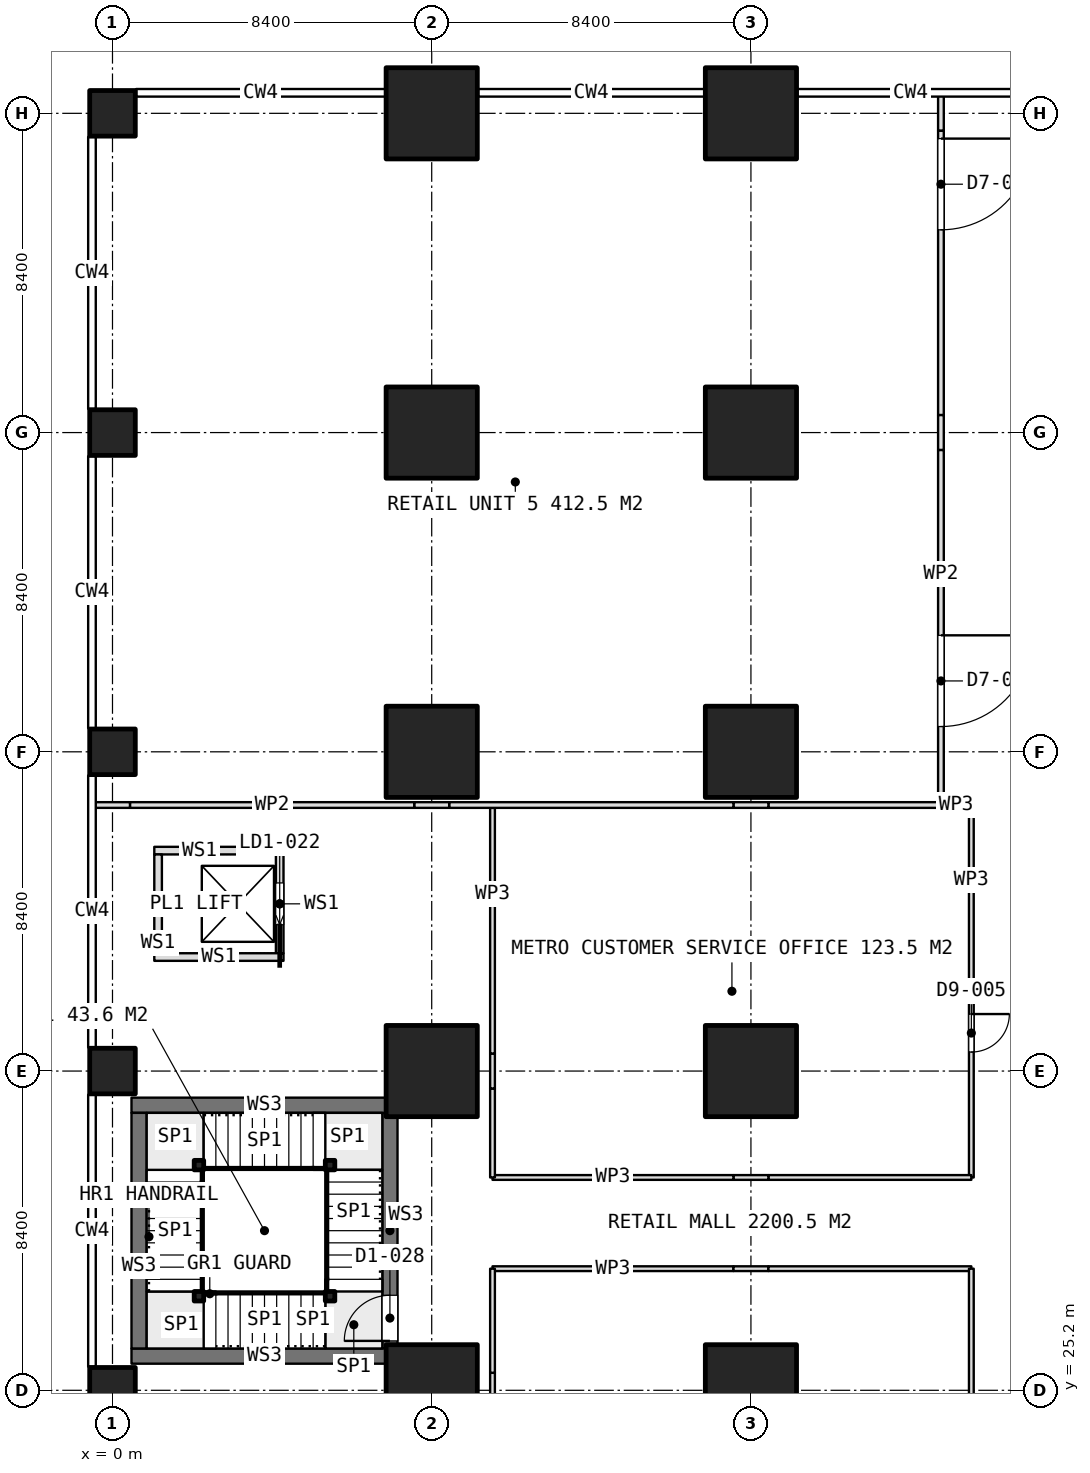
"""IFC4 building model, lengths in metres.
Left out: names, types, materials, properties, quantities, classifications, styles, units other than length and angle.
Written with IfcOpenShell. Run it as: python <this file> out.ifc"""

import sys

from ifc_helpers import new_model, si_unit, direction, frame, frame_2d, origin, origin_2d, place, context, subcontext, project, spatial, rectangle, extrude, element, fill, save


model = new_model("IFC4")
c1 = context("Model", 3, precision=1e-05, world=origin(), true_north=direction((0.0, 1.0)))
c2 = subcontext(c1, "Body", "Model", "MODEL_VIEW")
j1 = project(units=[si_unit("LENGTHUNIT", "METRE"), si_unit("PLANEANGLEUNIT", "RADIAN")], contexts=[c1])
p1 = place(None, origin())
s1 = spatial("IfcSite", under=j1, at=p1, CompositionType="ELEMENT")
p2 = place(p1, origin())
s2 = spatial("IfcBuilding", under=s1, at=p2, CompositionType="ELEMENT")
p3 = place(p2, frame((0.0, 0.0, 5.4)))
s3 = spatial("IfcBuildingStorey", under=s2, at=p3, CompositionType="ELEMENT", Elevation=5.4)
for number, where, z_axis, x_axis in (
    (1, (0.0, 25.2, 0.0), (0.0, 0.0, 1.0), (1.0, 0.0, 0.0)),
    (2, (0.0, 33.6, 0.0), (0.0, 0.0, 1.0), (1.0, 0.0, 0.0)),
    (3, (0.0, 42.0, 0.0), (0.0, 0.0, 1.0), (1.0, 0.0, 0.0)),
    (4, (0.0, 50.4, 0.0), (0.0, 0.0, 1.0), (1.0, 0.0, 0.0)),
    (5, (0.0, 58.8, 0.0), (0.0, 0.0, 1.0), (1.0, 0.0, 0.0)),
):
    element("IfcColumn", number, at=place(p3, frame(where, z_axis=z_axis, x_axis=x_axis)), inside=s3, PredefinedType="COLUMN", context=c2, shape_type="SweptSolid", body=[
        extrude(rectangle(XDim=1.2, YDim=1.2, at=origin_2d()), origin(), (0.0, 0.0, 1.0), 5.0),
    ])
for number, where, z_axis, x_axis in (
    (6, (8.4, 25.2, 0.0), (0.0, 0.0, 1.0), (1.0, 0.0, 0.0)),
    (7, (8.4, 33.6, 0.0), (0.0, 0.0, 1.0), (1.0, 0.0, 0.0)),
    (8, (8.4, 42.0, 0.0), (0.0, 0.0, 1.0), (1.0, 0.0, 0.0)),
    (9, (8.4, 50.4, 0.0), (0.0, 0.0, 1.0), (1.0, 0.0, 0.0)),
    (10, (8.4, 58.8, 0.0), (0.0, 0.0, 1.0), (1.0, 0.0, 0.0)),
    (11, (16.8, 25.2, 0.0), (0.0, 0.0, 1.0), (1.0, 0.0, 0.0)),
    (12, (16.8, 33.6, 0.0), (0.0, 0.0, 1.0), (1.0, 0.0, 0.0)),
    (13, (16.8, 42.0, 0.0), (0.0, 0.0, 1.0), (1.0, 0.0, 0.0)),
    (14, (16.8, 50.4, 0.0), (0.0, 0.0, 1.0), (1.0, 0.0, 0.0)),
    (15, (16.8, 58.8, 0.0), (0.0, 0.0, 1.0), (1.0, 0.0, 0.0)),
):
    element("IfcColumn", number, at=place(p3, frame(where, z_axis=z_axis, x_axis=x_axis)), inside=s3, PredefinedType="COLUMN", context=c2, shape_type="SweptSolid", body=[
        extrude(rectangle(XDim=2.4, YDim=2.4, at=origin_2d()), origin(), (0.0, 0.0, 1.0), 5.0),
    ])
for number, where, z_axis, x_axis in (
    (16, (0.5, 26.1, 0.0), (0.0, 0.0, 1.0), (1.0, 0.0, 0.0)),
    (17, (0.5, 32.7, 0.0), (0.0, 0.0, 1.0), (1.0, 0.0, 0.0)),
):
    element("IfcWall", number, at=place(p3, frame(where, z_axis=z_axis, x_axis=x_axis)), inside=s3, PredefinedType="SOLIDWALL", context=c2, shape_type="SweptSolid", body=[
        extrude(rectangle(XDim=7.0, YDim=0.4, at=frame_2d((3.5, 0.0))), origin(), (0.0, 0.0, 1.0), 4.7),
    ])
p4 = place(p3, frame((0.7, 26.3, 0.0), z_axis=(0.0, 0.0, 1.0), x_axis=(0.0, 1.0, 0.0)))
e18 = element("IfcWall", 18, at=p4, inside=s3, PredefinedType="SOLIDWALL", context=c2, shape_type="SweptSolid", body=[
    extrude(rectangle(XDim=6.2, YDim=0.4, at=frame_2d((3.1, 0.0))), origin(), (0.0, 0.0, 1.0), 4.7),
])
p5 = place(p3, frame((7.3, 26.3, 0.0), z_axis=(0.0, 0.0, 1.0), x_axis=(0.0, 1.0, 0.0)))
e19 = element("IfcWall", 19, at=p5, inside=s3, PredefinedType="SOLIDWALL", context=c2, shape_type="SweptSolid", body=[
    extrude(rectangle(XDim=6.2, YDim=0.4, at=frame_2d((3.1, 0.0))), origin(), (0.0, 0.0, 1.0), 4.7),
])
p6 = place(p5, frame((0.2, 0.0, 0.0)))
e20 = element("IfcOpeningElement", 20, at=p6, cuts=e19, PredefinedType="OPENING", context=c2, shape_type="SweptSolid", body=[
    extrude(rectangle(XDim=1.2, YDim=2.1, at=frame_2d((0.6, 1.05))), frame((0.0, 0.21, 0.0), z_axis=(0.0, -1.0, 0.0), x_axis=(1.0, 0.0, 0.0)), (0.0, 0.0, 1.0), 0.42),
])
for number, where, z_axis, x_axis in (
    (21, (1.1, 36.6, 0.0), (0.0, 0.0, 1.0), (1.0, 0.0, 0.0)),
    (22, (1.1, 39.4, 0.0), (0.0, 0.0, 1.0), (1.0, 0.0, 0.0)),
):
    element("IfcWall", number, at=place(p3, frame(where, z_axis=z_axis, x_axis=x_axis)), inside=s3, PredefinedType="PARTITIONING", context=c2, shape_type="SweptSolid", body=[
        extrude(rectangle(XDim=3.4, YDim=0.2, at=frame_2d((1.7, 0.0))), origin(), (0.0, 0.0, 1.0), 2.9),
    ])
p7 = place(p3, frame((1.2, 36.7, 0.0), z_axis=(0.0, 0.0, 1.0), x_axis=(0.0, 1.0, 0.0)))
e23 = element("IfcWall", 23, at=p7, inside=s3, PredefinedType="PARTITIONING", context=c2, shape_type="SweptSolid", body=[
    extrude(rectangle(XDim=2.6, YDim=0.2, at=frame_2d((1.3, 0.0))), origin(), (0.0, 0.0, 1.0), 2.9),
])
p8 = place(p3, frame((4.4, 36.7, 0.0), z_axis=(0.0, 0.0, 1.0), x_axis=(0.0, 1.0, 0.0)))
e24 = element("IfcWall", 24, at=p8, inside=s3, PredefinedType="PARTITIONING", context=c2, shape_type="SweptSolid", body=[
    extrude(rectangle(XDim=2.6, YDim=0.2, at=frame_2d((1.3, 0.0))), origin(), (0.0, 0.0, 1.0), 2.9),
])
p9 = place(p8, frame((0.75, 0.0, 0.0)))
e25 = element("IfcOpeningElement", 25, at=p9, cuts=e24, PredefinedType="OPENING", context=c2, shape_type="SweptSolid", body=[
    extrude(rectangle(XDim=1.1, YDim=2.1, at=frame_2d((0.55, 1.05))), frame((0.0, 0.11, 0.0), z_axis=(0.0, -1.0, 0.0), x_axis=(1.0, 0.0, 0.0)), (0.0, 0.0, 1.0), 0.22),
])
p10 = place(p3, frame((21.8, 59.29, 0.0), z_axis=(0.0, 0.0, 1.0), x_axis=(0.0, -1.0, 0.0)))
e26 = element("IfcWall", 26, at=p10, inside=s3, PredefinedType="PARTITIONING", context=c2, shape_type="SweptSolid", body=[
    extrude(rectangle(XDim=0.95, YDim=0.15, at=frame_2d((0.475, 0.0))), origin(), (0.0, 0.0, 1.0), 2.9),
])
p11 = place(p3, frame((21.8, 58.34, 0.0), z_axis=(0.0, 0.0, 1.0), x_axis=(0.0, -1.0, 0.0)))
e27 = element("IfcWall", 27, at=p11, inside=s3, PredefinedType="PARTITIONING", context=c2, shape_type="SweptSolid", body=[
    extrude(rectangle(XDim=7.48, YDim=0.15, at=frame_2d((3.74, 0.0))), origin(), (0.0, 0.0, 1.0), 4.7),
])
p12 = place(p11, frame((0.205, 0.0, 0.0)))
e28 = element("IfcOpeningElement", 28, at=p12, cuts=e27, PredefinedType="OPENING", context=c2, shape_type="SweptSolid", body=[
    extrude(rectangle(XDim=2.4, YDim=2.4, at=frame_2d((1.2, 1.2))), frame((0.0, 0.085, 0.0), z_axis=(0.0, -1.0, 0.0), x_axis=(1.0, 0.0, 0.0)), (0.0, 0.0, 1.0), 0.17),
])
p13 = place(p3, frame((21.8, 50.86, 0.0), z_axis=(0.0, 0.0, 1.0), x_axis=(0.0, -1.0, 0.0)))
e29 = element("IfcWall", 29, at=p13, inside=s3, PredefinedType="PARTITIONING", context=c2, shape_type="SweptSolid", body=[
    extrude(rectangle(XDim=0.92, YDim=0.15, at=frame_2d((0.46, 0.0))), origin(), (0.0, 0.0, 1.0), 2.9),
])
p14 = place(p3, frame((21.8, 49.94, 0.0), z_axis=(0.0, 0.0, 1.0), x_axis=(0.0, -1.0, 0.0)))
e30 = element("IfcWall", 30, at=p14, inside=s3, PredefinedType="PARTITIONING", context=c2, shape_type="SweptSolid", body=[
    extrude(rectangle(XDim=9.34, YDim=0.15, at=frame_2d((4.67, 0.0))), origin(), (0.0, 0.0, 1.0), 4.7),
])
p15 = place(p14, frame((4.875, 0.0, 0.0)))
e31 = element("IfcOpeningElement", 31, at=p15, cuts=e30, PredefinedType="OPENING", context=c2, shape_type="SweptSolid", body=[
    extrude(rectangle(XDim=2.4, YDim=2.4, at=frame_2d((1.2, 1.2))), frame((0.0, 0.085, 0.0), z_axis=(0.0, -1.0, 0.0), x_axis=(1.0, 0.0, 0.0)), (0.0, 0.0, 1.0), 0.17),
])
p16 = place(p3, frame((21.8, 40.6, 0.0), z_axis=(0.0, 0.0, 1.0), x_axis=(-1.0, 0.0, 0.0)))
e32 = element("IfcWall", 32, at=p16, inside=s3, PredefinedType="PARTITIONING", context=c2, shape_type="SweptSolid", body=[
    extrude(rectangle(XDim=4.54, YDim=0.15, at=frame_2d((2.27, 0.0))), origin(), (0.0, 0.0, 1.0), 4.7),
])
p17 = place(p3, frame((17.26, 40.6, 0.0), z_axis=(0.0, 0.0, 1.0), x_axis=(-1.0, 0.0, 0.0)))
e33 = element("IfcWall", 33, at=p17, inside=s3, PredefinedType="PARTITIONING", context=c2, shape_type="SweptSolid", body=[
    extrude(rectangle(XDim=0.92, YDim=0.15, at=frame_2d((0.46, 0.0))), origin(), (0.0, 0.0, 1.0), 2.9),
])
p18 = place(p3, frame((16.34, 40.6, 0.0), z_axis=(0.0, 0.0, 1.0), x_axis=(-1.0, 0.0, 0.0)))
e34 = element("IfcWall", 34, at=p18, inside=s3, PredefinedType="PARTITIONING", context=c2, shape_type="SweptSolid", body=[
    extrude(rectangle(XDim=7.48, YDim=0.15, at=frame_2d((3.74, 0.0))), origin(), (0.0, 0.0, 1.0), 4.7),
])
p19 = place(p3, frame((8.86, 40.6, 0.0), z_axis=(0.0, 0.0, 1.0), x_axis=(-1.0, 0.0, 0.0)))
e35 = element("IfcWall", 35, at=p19, inside=s3, PredefinedType="PARTITIONING", context=c2, shape_type="SweptSolid", body=[
    extrude(rectangle(XDim=0.92, YDim=0.15, at=frame_2d((0.46, 0.0))), origin(), (0.0, 0.0, 1.0), 2.9),
])
p20 = place(p3, frame((7.94, 40.6, 0.0), z_axis=(0.0, 0.0, 1.0), x_axis=(-1.0, 0.0, 0.0)))
e36 = element("IfcWall", 36, at=p20, inside=s3, PredefinedType="PARTITIONING", context=c2, shape_type="SweptSolid", body=[
    extrude(rectangle(XDim=7.48, YDim=0.15, at=frame_2d((3.74, 0.0))), origin(), (0.0, 0.0, 1.0), 4.7),
])
p21 = place(p3, frame((0.46, 40.6, 0.0), z_axis=(0.0, 0.0, 1.0), x_axis=(-1.0, 0.0, 0.0)))
e37 = element("IfcWall", 37, at=p21, inside=s3, PredefinedType="PARTITIONING", context=c2, shape_type="SweptSolid", body=[
    extrude(rectangle(XDim=0.95, YDim=0.15, at=frame_2d((0.475, 0.0))), origin(), (0.0, 0.0, 1.0), 2.9),
])
p22 = place(p3, frame((10.0, 28.4, 0.0), z_axis=(0.0, 0.0, 1.0), x_axis=(1.0, 0.0, 0.0)))
e38 = element("IfcWall", 38, at=p22, inside=s3, PredefinedType="PARTITIONING", context=c2, shape_type="SweptSolid", body=[
    extrude(rectangle(XDim=6.34, YDim=0.125, at=frame_2d((3.17, 0.0))), origin(), (0.0, 0.0, 1.0), 4.7),
])
p23 = place(p3, frame((16.34, 28.4, 0.0), z_axis=(0.0, 0.0, 1.0), x_axis=(1.0, 0.0, 0.0)))
e39 = element("IfcWall", 39, at=p23, inside=s3, PredefinedType="PARTITIONING", context=c2, shape_type="SweptSolid", body=[
    extrude(rectangle(XDim=0.92, YDim=0.125, at=frame_2d((0.46, 0.0))), origin(), (0.0, 0.0, 1.0), 2.9),
])
p24 = place(p3, frame((17.26, 28.4, 0.0), z_axis=(0.0, 0.0, 1.0), x_axis=(1.0, 0.0, 0.0)))
e40 = element("IfcWall", 40, at=p24, inside=s3, PredefinedType="PARTITIONING", context=c2, shape_type="SweptSolid", body=[
    extrude(rectangle(XDim=5.34, YDim=0.125, at=frame_2d((2.67, 0.0))), origin(), (0.0, 0.0, 1.0), 4.7),
])
p25 = place(p3, frame((22.6, 28.4, 0.0), z_axis=(0.0, 0.0, 1.0), x_axis=(0.0, -1.0, 0.0)))
e41 = element("IfcWall", 41, at=p25, inside=s3, PredefinedType="PARTITIONING", context=c2, shape_type="SweptSolid", body=[
    extrude(rectangle(XDim=9.8, YDim=0.125, at=frame_2d((4.9, 0.0))), origin(), (0.0, 0.0, 1.0), 4.7),
])
p26 = place(p25, frame((4.4, 0.0, 0.0)))
e42 = element("IfcOpeningElement", 42, at=p26, cuts=e41, PredefinedType="OPENING", context=c2, shape_type="SweptSolid", body=[
    extrude(rectangle(XDim=1.0, YDim=2.1, at=frame_2d((0.5, 1.05))), frame((0.0, 0.073, 0.0), z_axis=(0.0, -1.0, 0.0), x_axis=(1.0, 0.0, 0.0)), (0.0, 0.0, 1.0), 0.145),
])
p27 = place(p3, frame((10.0, 24.74, 0.0), z_axis=(0.0, 0.0, 1.0), x_axis=(0.0, 1.0, 0.0)))
e43 = element("IfcWall", 43, at=p27, inside=s3, PredefinedType="PARTITIONING", context=c2, shape_type="SweptSolid", body=[
    extrude(rectangle(XDim=0.92, YDim=0.125, at=frame_2d((0.46, 0.0))), origin(), (0.0, 0.0, 1.0), 2.9),
])
p28 = place(p3, frame((10.0, 25.66, 0.0), z_axis=(0.0, 0.0, 1.0), x_axis=(0.0, 1.0, 0.0)))
e44 = element("IfcWall", 44, at=p28, inside=s3, PredefinedType="PARTITIONING", context=c2, shape_type="SweptSolid", body=[
    extrude(rectangle(XDim=2.74, YDim=0.125, at=frame_2d((1.37, 0.0))), origin(), (0.0, 0.0, 1.0), 4.7),
])
p29 = place(p3, frame((22.6, 40.6, 0.0), z_axis=(0.0, 0.0, 1.0), x_axis=(0.0, -1.0, 0.0)))
e45 = element("IfcWall", 45, at=p29, inside=s3, PredefinedType="PARTITIONING", context=c2, shape_type="SweptSolid", body=[
    extrude(rectangle(XDim=9.8, YDim=0.125, at=frame_2d((4.9, 0.0))), origin(), (0.0, 0.0, 1.0), 4.7),
])
p30 = place(p29, frame((5.5, 0.0, 0.0)))
e46 = element("IfcOpeningElement", 46, at=p30, cuts=e45, PredefinedType="OPENING", context=c2, shape_type="SweptSolid", body=[
    extrude(rectangle(XDim=1.0, YDim=2.1, at=frame_2d((0.5, 1.05))), frame((0.0, 0.073, 0.0), z_axis=(0.0, -1.0, 0.0), x_axis=(1.0, 0.0, 0.0)), (0.0, 0.0, 1.0), 0.145),
])
p31 = place(p3, frame((22.6, 30.8, 0.0), z_axis=(0.0, 0.0, 1.0), x_axis=(-1.0, 0.0, 0.0)))
e47 = element("IfcWall", 47, at=p31, inside=s3, PredefinedType="PARTITIONING", context=c2, shape_type="SweptSolid", body=[
    extrude(rectangle(XDim=5.34, YDim=0.125, at=frame_2d((2.67, 0.0))), origin(), (0.0, 0.0, 1.0), 4.7),
])
p32 = place(p3, frame((17.26, 30.8, 0.0), z_axis=(0.0, 0.0, 1.0), x_axis=(-1.0, 0.0, 0.0)))
e48 = element("IfcWall", 48, at=p32, inside=s3, PredefinedType="PARTITIONING", context=c2, shape_type="SweptSolid", body=[
    extrude(rectangle(XDim=0.92, YDim=0.125, at=frame_2d((0.46, 0.0))), origin(), (0.0, 0.0, 1.0), 2.9),
])
p33 = place(p3, frame((16.34, 30.8, 0.0), z_axis=(0.0, 0.0, 1.0), x_axis=(-1.0, 0.0, 0.0)))
e49 = element("IfcWall", 49, at=p33, inside=s3, PredefinedType="PARTITIONING", context=c2, shape_type="SweptSolid", body=[
    extrude(rectangle(XDim=6.34, YDim=0.125, at=frame_2d((3.17, 0.0))), origin(), (0.0, 0.0, 1.0), 4.7),
])
p34 = place(p3, frame((10.0, 30.8, 0.0), z_axis=(0.0, 0.0, 1.0), x_axis=(0.0, 1.0, 0.0)))
e50 = element("IfcWall", 50, at=p34, inside=s3, PredefinedType="PARTITIONING", context=c2, shape_type="SweptSolid", body=[
    extrude(rectangle(XDim=2.34, YDim=0.125, at=frame_2d((1.17, 0.0))), origin(), (0.0, 0.0, 1.0), 4.7),
])
p35 = place(p3, frame((10.0, 33.14, 0.0), z_axis=(0.0, 0.0, 1.0), x_axis=(0.0, 1.0, 0.0)))
e51 = element("IfcWall", 51, at=p35, inside=s3, PredefinedType="PARTITIONING", context=c2, shape_type="SweptSolid", body=[
    extrude(rectangle(XDim=0.92, YDim=0.125, at=frame_2d((0.46, 0.0))), origin(), (0.0, 0.0, 1.0), 2.9),
])
p36 = place(p3, frame((10.0, 34.06, 0.0), z_axis=(0.0, 0.0, 1.0), x_axis=(0.0, 1.0, 0.0)))
e52 = element("IfcWall", 52, at=p36, inside=s3, PredefinedType="PARTITIONING", context=c2, shape_type="SweptSolid", body=[
    extrude(rectangle(XDim=6.465, YDim=0.125, at=frame_2d((3.232, 0.0))), origin(), (0.0, 0.0, 1.0), 4.7),
])
p37 = place(p3, frame((21.8, 40.6, 0.0), z_axis=(0.0, 0.0, 1.0), x_axis=(1.0, 0.0, 0.0)))
e53 = element("IfcWall", 53, at=p37, inside=s3, PredefinedType="PARTITIONING", context=c2, shape_type="SweptSolid", body=[
    extrude(rectangle(XDim=0.8, YDim=0.125, at=frame_2d((0.4, 0.0))), origin(), (0.0, 0.0, 1.0), 4.7),
])
for number, where, z_axis, x_axis in (
    (54, (5.725, 27.675, 0.0), (0.0, 0.0, 1.0), (1.0, 0.0, 0.0)),
    (55, (2.275, 27.675, 0.0), (0.0, 0.0, 1.0), (1.0, 0.0, 0.0)),
    (56, (2.275, 31.125, 0.0), (0.0, 0.0, 1.0), (1.0, 0.0, 0.0)),
    (57, (5.725, 31.125, 0.0), (0.0, 0.0, 1.0), (1.0, 0.0, 0.0)),
):
    element("IfcColumn", number, at=place(p3, frame(where, z_axis=z_axis, x_axis=x_axis)), inside=s3, PredefinedType="COLUMN", context=c2, shape_type="SweptSolid", body=[
        extrude(rectangle(XDim=0.25, YDim=0.25, at=origin_2d()), origin(), (0.0, 0.0, 1.0), 5.0),
    ])
p38 = place(p9, origin())
e58 = element("IfcDoor", 58, at=p38, inside=s3, OperationType="SLIDING_TO_LEFT", PredefinedType="USERDEFINED", context=c2, shape_type="SweptSolid", body=[
    extrude(rectangle(XDim=1.1, YDim=2.1, at=frame_2d((0.55, 1.05))), frame((0.0, 0.025, 0.0), z_axis=(0.0, -1.0, 0.0), x_axis=(1.0, 0.0, 0.0)), (0.0, 0.0, 1.0), 0.05),
])
fill(e25, e58)
p39 = place(p15, origin())
e59 = element("IfcDoor", 59, at=p39, inside=s3, OperationType="DOUBLE_DOOR_SINGLE_SWING", PredefinedType="DOOR", context=c2, shape_type="SweptSolid", body=[
    extrude(rectangle(XDim=2.4, YDim=2.4, at=frame_2d((1.2, 1.2))), frame((0.0, 0.025, 0.0), z_axis=(0.0, -1.0, 0.0), x_axis=(1.0, 0.0, 0.0)), (0.0, 0.0, 1.0), 0.05),
])
fill(e31, e59)
p40 = place(p12, origin())
e60 = element("IfcDoor", 60, at=p40, inside=s3, OperationType="DOUBLE_DOOR_SINGLE_SWING", PredefinedType="DOOR", context=c2, shape_type="SweptSolid", body=[
    extrude(rectangle(XDim=2.4, YDim=2.4, at=frame_2d((1.2, 1.2))), frame((0.0, 0.025, 0.0), z_axis=(0.0, -1.0, 0.0), x_axis=(1.0, 0.0, 0.0)), (0.0, 0.0, 1.0), 0.05),
])
fill(e28, e60)
p41 = place(p30, origin())
e61 = element("IfcDoor", 61, at=p41, inside=s3, OperationType="SINGLE_SWING_LEFT", PredefinedType="DOOR", context=c2, shape_type="SweptSolid", body=[
    extrude(rectangle(XDim=1.0, YDim=2.1, at=frame_2d((0.5, 1.05))), frame((0.0, 0.025, 0.0), z_axis=(0.0, -1.0, 0.0), x_axis=(1.0, 0.0, 0.0)), (0.0, 0.0, 1.0), 0.05),
])
fill(e46, e61)
p42 = place(p6, origin())
e62 = element("IfcDoor", 62, at=p42, inside=s3, OperationType="SINGLE_SWING_RIGHT", PredefinedType="DOOR", context=c2, shape_type="SweptSolid", body=[
    extrude(rectangle(XDim=1.2, YDim=2.1, at=frame_2d((0.6, 1.05))), frame((0.0, 0.025, 0.0), z_axis=(0.0, -1.0, 0.0), x_axis=(1.0, 0.0, 0.0)), (0.0, 0.0, 1.0), 0.05),
])
fill(e20, e62)
save(model, sys.argv[1])
